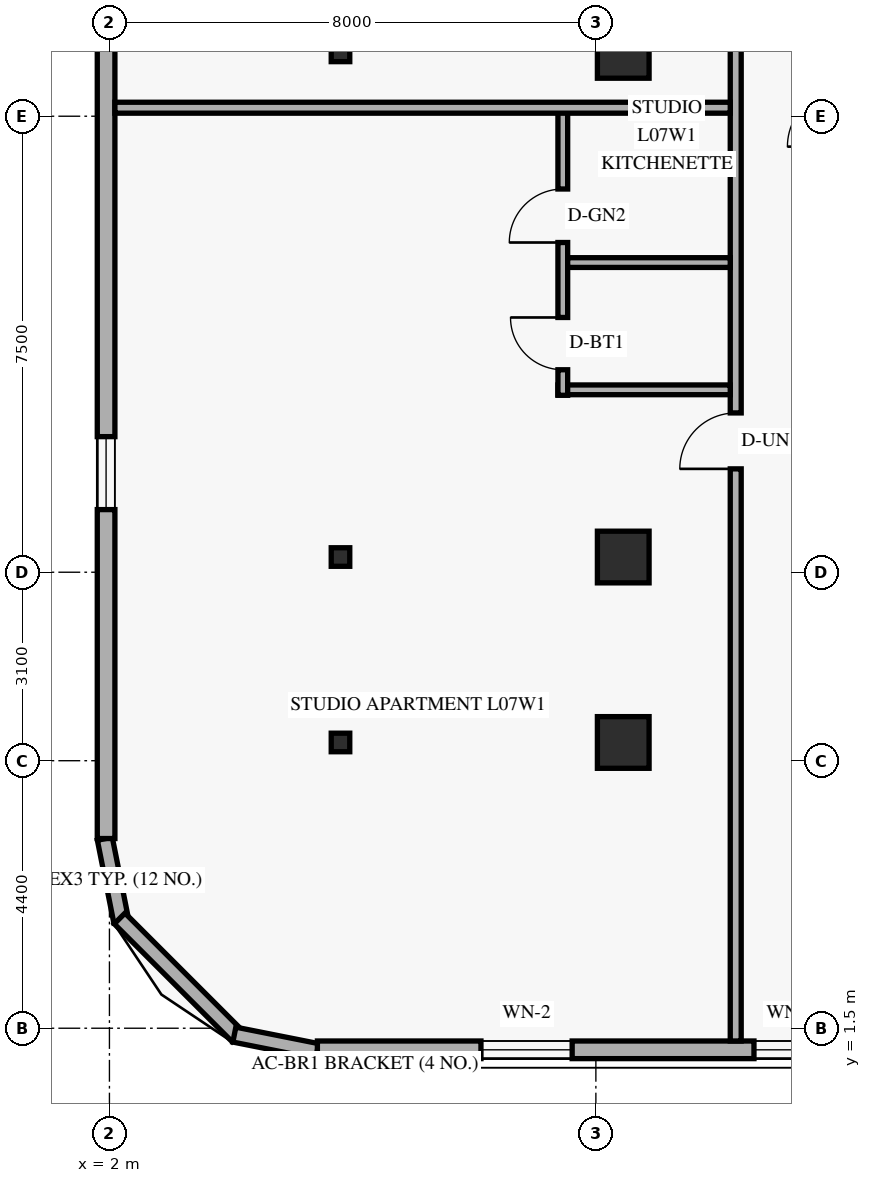
"""IFC4 building model, lengths in metres.
Left out: names, types, materials, properties, quantities, classifications, styles, units other than length and angle.
Written with IfcOpenShell. Run it as: python <this file> out.ifc"""

import sys

from ifc_helpers import new_model, si_unit, direction, frame, frame_2d, origin, origin_2d, place, context, subcontext, project, spatial, rectangle, hollow_rectangle, extrude, element, fill, save


model = new_model("IFC4")
c1 = context("Model", 3, precision=1e-05, world=origin(), true_north=direction((0.0, 1.0)))
c2 = subcontext(c1, "Body", "Model", "MODEL_VIEW")
j1 = project(units=[si_unit("LENGTHUNIT", "METRE"), si_unit("PLANEANGLEUNIT", "RADIAN")], contexts=[c1])
p1 = place(None, origin())
s1 = spatial("IfcSite", under=j1, at=p1, CompositionType="ELEMENT")
p2 = place(p1, origin())
s2 = spatial("IfcBuilding", under=s1, at=p2, CompositionType="ELEMENT")
p3 = place(p2, frame((0.0, 0.0, 31.2)))
s3 = spatial("IfcBuildingStorey", under=s2, at=p3, CompositionType="ELEMENT", Elevation=31.2)
for number, where, z_axis, x_axis in (
    (1, (5.8, 6.2, 0.0), (0.0, 0.0, 1.0), (1.0, 0.0, 0.0)),
    (2, (5.8, 9.25, 0.0), (0.0, 0.0, 1.0), (1.0, 0.0, 0.0)),
    (3, (5.8, 17.55, 0.0), (0.0, 0.0, 1.0), (1.0, 0.0, 0.0)),
):
    element("IfcColumn", number, at=place(p3, frame(where, z_axis=z_axis, x_axis=x_axis)), inside=s3, PredefinedType="COLUMN", context=c2, shape_type="SweptSolid", body=[
        extrude(hollow_rectangle(XDim=0.305, YDim=0.305, WallThickness=0.013, at=origin_2d()), origin(), (0.0, 0.0, 1.0), 3.6),
    ])
for number, where, z_axis, x_axis in (
    (4, (10.45, 6.2, 0.0), (0.0, 0.0, 1.0), (1.0, 0.0, 0.0)),
    (5, (10.45, 9.25, 0.0), (0.0, 0.0, 1.0), (1.0, 0.0, 0.0)),
    (6, (10.45, 17.55, 0.0), (0.0, 0.0, 1.0), (1.0, 0.0, 0.0)),
):
    element("IfcColumn", number, at=place(p3, frame(where, z_axis=z_axis, x_axis=x_axis)), inside=s3, PredefinedType="COLUMN", context=c2, shape_type="SweptSolid", body=[
        extrude(rectangle(XDim=0.85, YDim=0.85, at=origin_2d()), origin(), (0.0, 0.0, 1.0), 3.6),
    ])
p4 = place(p3, frame((1.924, 4.616, 0.0), z_axis=(0.0, 0.0, 1.0), x_axis=(0.19496651342, -0.980809899341, 0.0)))
e7 = element("IfcWall", 7, at=p4, inside=s3, PredefinedType="SOLIDWALL", context=c2, shape_type="SweptSolid", body=[
    extrude(rectangle(XDim=1.389, YDim=0.25, at=frame_2d((0.694, 0.0))), origin(), (0.0, 0.0, 1.0), 3.36),
])
p5 = place(p3, frame((2.168, 3.305, 0.0), z_axis=(0.0, 0.0, 1.0), x_axis=(0.707106781187, -0.707106781187, 0.0)))
e8 = element("IfcWall", 8, at=p5, inside=s3, PredefinedType="SOLIDWALL", context=c2, shape_type="SweptSolid", body=[
    extrude(rectangle(XDim=2.739, YDim=0.25, at=frame_2d((1.37, 0.0))), origin(), (0.0, 0.0, 1.0), 3.36),
])
p6 = place(p3, frame((4.054, 1.395, 0.0), z_axis=(0.0, 0.0, 1.0), x_axis=(0.980809899341, -0.19496651342, 0.0)))
e9 = element("IfcWall", 9, at=p6, inside=s3, PredefinedType="SOLIDWALL", context=c2, shape_type="SweptSolid", body=[
    extrude(rectangle(XDim=1.389, YDim=0.25, at=frame_2d((0.694, 0.0))), origin(), (0.0, 0.0, 1.0), 3.36),
])
p7 = place(p3, frame((5.42, 1.145, 0.0), z_axis=(0.0, 0.0, 1.0), x_axis=(1.0, 0.0, 0.0)))
e10 = element("IfcWall", 10, at=p7, inside=s3, PredefinedType="SOLIDWALL", context=c2, shape_type="SweptSolid", body=[
    extrude(rectangle(XDim=19.58, YDim=0.29, at=frame_2d((9.79, 0.0))), origin(), (0.0, 0.0, 1.0), 3.36),
])
p8 = place(p7, frame((2.69, 0.0, 0.85)))
e11 = element("IfcOpeningElement", 11, at=p8, cuts=e10, PredefinedType="OPENING", context=c2, shape_type="SweptSolid", body=[
    extrude(rectangle(XDim=1.5, YDim=1.55, at=frame_2d((0.75, 0.775))), frame((0.0, 0.155, 0.0), z_axis=(0.0, -1.0, 0.0), x_axis=(1.0, 0.0, 0.0)), (0.0, 0.0, 1.0), 0.31),
])
p9 = place(p7, frame((7.18, 0.0, 0.85)))
e12 = element("IfcOpeningElement", 12, at=p9, cuts=e10, PredefinedType="OPENING", context=c2, shape_type="SweptSolid", body=[
    extrude(rectangle(XDim=1.2, YDim=1.5, at=frame_2d((0.6, 0.75))), frame((0.0, 0.155, 0.0), z_axis=(0.0, -1.0, 0.0), x_axis=(1.0, 0.0, 0.0)), (0.0, 0.0, 1.0), 0.31),
])
p10 = place(p7, frame((11.095, 0.0, 0.85)))
e13 = element("IfcOpeningElement", 13, at=p10, cuts=e10, PredefinedType="OPENING", context=c2, shape_type="SweptSolid", body=[
    extrude(rectangle(XDim=1.5, YDim=1.55, at=frame_2d((0.75, 0.775))), frame((0.0, 0.155, 0.0), z_axis=(0.0, -1.0, 0.0), x_axis=(1.0, 0.0, 0.0)), (0.0, 0.0, 1.0), 0.31),
])
p11 = place(p7, frame((16.33, 0.0, 0.85)))
e14 = element("IfcOpeningElement", 14, at=p11, cuts=e10, PredefinedType="OPENING", context=c2, shape_type="SweptSolid", body=[
    extrude(rectangle(XDim=1.5, YDim=1.55, at=frame_2d((0.75, 0.775))), frame((0.0, 0.155, 0.0), z_axis=(0.0, -1.0, 0.0), x_axis=(1.0, 0.0, 0.0)), (0.0, 0.0, 1.0), 0.31),
])
p12 = place(p3, frame((1.945, 43.38, 0.0), z_axis=(0.0, 0.0, 1.0), x_axis=(0.0, -1.0, 0.0)))
e15 = element("IfcWall", 15, at=p12, inside=s3, PredefinedType="SOLIDWALL", context=c2, shape_type="SweptSolid", body=[
    extrude(rectangle(XDim=38.76, YDim=0.29, at=frame_2d((19.38, 0.0))), origin(), (0.0, 0.0, 1.0), 3.36),
])
p13 = place(p12, frame((32.15, 0.0, 0.85)))
e16 = element("IfcOpeningElement", 16, at=p13, cuts=e15, PredefinedType="OPENING", context=c2, shape_type="SweptSolid", body=[
    extrude(rectangle(XDim=1.2, YDim=1.5, at=frame_2d((0.6, 0.75))), frame((0.0, 0.155, 0.0), z_axis=(0.0, -1.0, 0.0), x_axis=(1.0, 0.0, 0.0)), (0.0, 0.0, 1.0), 0.31),
])
p14 = place(p12, frame((24.138, 0.0, 0.85)))
e17 = element("IfcOpeningElement", 17, at=p14, cuts=e15, PredefinedType="OPENING", context=c2, shape_type="SweptSolid", body=[
    extrude(rectangle(XDim=1.2, YDim=1.5, at=frame_2d((0.6, 0.75))), frame((0.0, 0.155, 0.0), z_axis=(0.0, -1.0, 0.0), x_axis=(1.0, 0.0, 0.0)), (0.0, 0.0, 1.0), 0.31),
])
p15 = place(p12, frame((18.313, 0.0, 0.85)))
e18 = element("IfcOpeningElement", 18, at=p15, cuts=e15, PredefinedType="OPENING", context=c2, shape_type="SweptSolid", body=[
    extrude(rectangle(XDim=1.2, YDim=1.5, at=frame_2d((0.6, 0.75))), frame((0.0, 0.155, 0.0), z_axis=(0.0, -1.0, 0.0), x_axis=(1.0, 0.0, 0.0)), (0.0, 0.0, 1.0), 0.31),
])
p16 = place(p12, frame((12.495, 0.0, 0.85)))
e19 = element("IfcOpeningElement", 19, at=p16, cuts=e15, PredefinedType="OPENING", context=c2, shape_type="SweptSolid", body=[
    extrude(rectangle(XDim=1.2, YDim=1.5, at=frame_2d((0.6, 0.75))), frame((0.0, 0.155, 0.0), z_axis=(0.0, -1.0, 0.0), x_axis=(1.0, 0.0, 0.0)), (0.0, 0.0, 1.0), 0.31),
])
p17 = place(p12, frame((8.865, 0.0, 0.85)))
e20 = element("IfcOpeningElement", 20, at=p17, cuts=e15, PredefinedType="OPENING", context=c2, shape_type="SweptSolid", body=[
    extrude(rectangle(XDim=1.2, YDim=1.5, at=frame_2d((0.6, 0.75))), frame((0.0, 0.155, 0.0), z_axis=(0.0, -1.0, 0.0), x_axis=(1.0, 0.0, 0.0)), (0.0, 0.0, 1.0), 0.31),
])
p18 = place(p12, frame((3.315, 0.0, 0.85)))
e21 = element("IfcOpeningElement", 21, at=p18, cuts=e15, PredefinedType="OPENING", context=c2, shape_type="SweptSolid", body=[
    extrude(rectangle(XDim=1.2, YDim=1.5, at=frame_2d((0.6, 0.75))), frame((0.0, 0.155, 0.0), z_axis=(0.0, -1.0, 0.0), x_axis=(1.0, 0.0, 0.0)), (0.0, 0.0, 1.0), 0.31),
])
p19 = place(p3, frame((12.3, 1.29, 0.0), z_axis=(0.0, 0.0, 1.0), x_axis=(0.0, 1.0, 0.0)))
e22 = element("IfcWall", 22, at=p19, inside=s3, PredefinedType="STANDARD", context=c2, shape_type="SweptSolid", body=[
    extrude(rectangle(XDim=45.42, YDim=0.18, at=frame_2d((22.71, 0.0))), origin(), (0.0, 0.0, 1.0), 2.649),
])
p20 = place(p19, frame((9.41, 0.0, 0.0)))
e23 = element("IfcOpeningElement", 23, at=p20, cuts=e22, PredefinedType="OPENING", context=c2, shape_type="SweptSolid", body=[
    extrude(rectangle(XDim=0.92, YDim=2.15, at=frame_2d((0.46, 1.075))), frame((0.0, 0.1, 0.0), z_axis=(0.0, -1.0, 0.0), x_axis=(1.0, 0.0, 0.0)), (0.0, 0.0, 1.0), 0.2),
])
p21 = place(p19, frame((21.05, 0.0, 0.0)))
e24 = element("IfcOpeningElement", 24, at=p21, cuts=e22, PredefinedType="OPENING", context=c2, shape_type="SweptSolid", body=[
    extrude(rectangle(XDim=0.92, YDim=2.15, at=frame_2d((0.46, 1.075))), frame((0.0, 0.1, 0.0), z_axis=(0.0, -1.0, 0.0), x_axis=(1.0, 0.0, 0.0)), (0.0, 0.0, 1.0), 0.2),
])
p22 = place(p19, frame((36.491, 0.0, 0.0)))
e25 = element("IfcOpeningElement", 25, at=p22, cuts=e22, PredefinedType="OPENING", context=c2, shape_type="SweptSolid", body=[
    extrude(rectangle(XDim=0.92, YDim=2.15, at=frame_2d((0.46, 1.075))), frame((0.0, 0.1, 0.0), z_axis=(0.0, -1.0, 0.0), x_axis=(1.0, 0.0, 0.0)), (0.0, 0.0, 1.0), 0.2),
])
p23 = place(p3, frame((9.376, 12.0, 0.0), z_axis=(0.0, 0.0, 1.0), x_axis=(1.0, 0.0, 0.0)))
e26 = element("IfcWall", 26, at=p23, inside=s3, PredefinedType="PLUMBINGWALL", context=c2, shape_type="SweptSolid", body=[
    extrude(rectangle(XDim=2.834, YDim=0.16, at=frame_2d((1.417, 0.0))), origin(), (0.0, 0.0, 1.0), 2.649),
])
p24 = place(p3, frame((9.456, 11.91, 0.0), z_axis=(0.0, 0.0, 1.0), x_axis=(0.0, 1.0, 0.0)))
e27 = element("IfcWall", 27, at=p24, inside=s3, PredefinedType="PLUMBINGWALL", context=c2, shape_type="SweptSolid", body=[
    extrude(rectangle(XDim=4.73, YDim=0.16, at=frame_2d((2.365, 0.0))), origin(), (0.0, 0.0, 1.0), 2.932),
])
p25 = place(p24, frame((0.42, 0.0, 0.0)))
e28 = element("IfcOpeningElement", 28, at=p25, cuts=e27, PredefinedType="OPENING", context=c2, shape_type="SweptSolid", body=[
    extrude(rectangle(XDim=0.86, YDim=2.12, at=frame_2d((0.43, 1.06))), frame((0.0, 0.09, 0.0), z_axis=(0.0, -1.0, 0.0), x_axis=(1.0, 0.0, 0.0)), (0.0, 0.0, 1.0), 0.18),
])
p26 = place(p24, frame((2.513, 0.0, 0.0)))
e29 = element("IfcOpeningElement", 29, at=p26, cuts=e27, PredefinedType="OPENING", context=c2, shape_type="SweptSolid", body=[
    extrude(rectangle(XDim=0.88, YDim=2.12, at=frame_2d((0.44, 1.06))), frame((0.0, 0.09, 0.0), z_axis=(0.0, -1.0, 0.0), x_axis=(1.0, 0.0, 0.0)), (0.0, 0.0, 1.0), 0.18),
])
p27 = place(p3, frame((9.536, 14.093, 0.0), z_axis=(0.0, 0.0, 1.0), x_axis=(1.0, 0.0, 0.0)))
e30 = element("IfcWall", 30, at=p27, inside=s3, PredefinedType="PLUMBINGWALL", context=c2, shape_type="SweptSolid", body=[
    extrude(rectangle(XDim=2.674, YDim=0.16, at=frame_2d((1.337, 0.0))), origin(), (0.0, 0.0, 1.0), 2.649),
])
p28 = place(p3, frame((2.09, 16.64, 0.0), z_axis=(0.0, 0.0, 1.0), x_axis=(1.0, 0.0, 0.0)))
e31 = element("IfcWall", 31, at=p28, inside=s3, PredefinedType="PARTITIONING", context=c2, shape_type="SweptSolid", body=[
    extrude(rectangle(XDim=10.12, YDim=0.18, at=frame_2d((5.06, 0.0))), origin(), (0.0, 0.0, 1.0), 2.649),
])
p29 = place(p8, origin())
e32 = element("IfcWindow", 32, at=p29, inside=s3, PartitioningType="SINGLE_PANEL", PredefinedType="WINDOW", context=c2, shape_type="SweptSolid", body=[
    extrude(rectangle(XDim=1.5, YDim=1.55, at=frame_2d((0.75, 0.775))), frame((0.0, 0.03, 0.0), z_axis=(0.0, -1.0, 0.0), x_axis=(1.0, 0.0, 0.0)), (0.0, 0.0, 1.0), 0.06),
])
fill(e11, e32)
p30 = place(p9, origin())
e33 = element("IfcWindow", 33, at=p30, inside=s3, PartitioningType="SINGLE_PANEL", PredefinedType="WINDOW", context=c2, shape_type="SweptSolid", body=[
    extrude(rectangle(XDim=1.2, YDim=1.5, at=frame_2d((0.6, 0.75))), frame((0.0, 0.03, 0.0), z_axis=(0.0, -1.0, 0.0), x_axis=(1.0, 0.0, 0.0)), (0.0, 0.0, 1.0), 0.06),
])
fill(e12, e33)
p31 = place(p13, origin())
e34 = element("IfcWindow", 34, at=p31, inside=s3, PartitioningType="SINGLE_PANEL", PredefinedType="WINDOW", context=c2, shape_type="SweptSolid", body=[
    extrude(rectangle(XDim=1.2, YDim=1.5, at=frame_2d((0.6, 0.75))), frame((0.0, 0.03, 0.0), z_axis=(0.0, -1.0, 0.0), x_axis=(1.0, 0.0, 0.0)), (0.0, 0.0, 1.0), 0.06),
])
fill(e16, e34)
p32 = place(p20, origin())
e35 = element("IfcDoor", 35, at=p32, inside=s3, OperationType="SINGLE_SWING_LEFT", PredefinedType="DOOR", context=c2, shape_type="SweptSolid", body=[
    extrude(rectangle(XDim=0.92, YDim=2.15, at=frame_2d((0.46, 1.075))), frame((0.0, 0.025, 0.0), z_axis=(0.0, -1.0, 0.0), x_axis=(1.0, 0.0, 0.0)), (0.0, 0.0, 1.0), 0.05),
])
fill(e23, e35)
p33 = place(p25, origin())
e36 = element("IfcDoor", 36, at=p33, inside=s3, OperationType="SINGLE_SWING_RIGHT", PredefinedType="DOOR", context=c2, shape_type="SweptSolid", body=[
    extrude(rectangle(XDim=0.86, YDim=2.12, at=frame_2d((0.43, 1.06))), frame((0.0, 0.025, 0.0), z_axis=(0.0, -1.0, 0.0), x_axis=(1.0, 0.0, 0.0)), (0.0, 0.0, 1.0), 0.05),
])
fill(e28, e36)
p34 = place(p26, origin())
e37 = element("IfcDoor", 37, at=p34, inside=s3, OperationType="SINGLE_SWING_LEFT", PredefinedType="DOOR", context=c2, shape_type="SweptSolid", body=[
    extrude(rectangle(XDim=0.88, YDim=2.12, at=frame_2d((0.44, 1.06))), frame((0.0, 0.025, 0.0), z_axis=(0.0, -1.0, 0.0), x_axis=(1.0, 0.0, 0.0)), (0.0, 0.0, 1.0), 0.05),
])
fill(e29, e37)
save(model, sys.argv[1])
